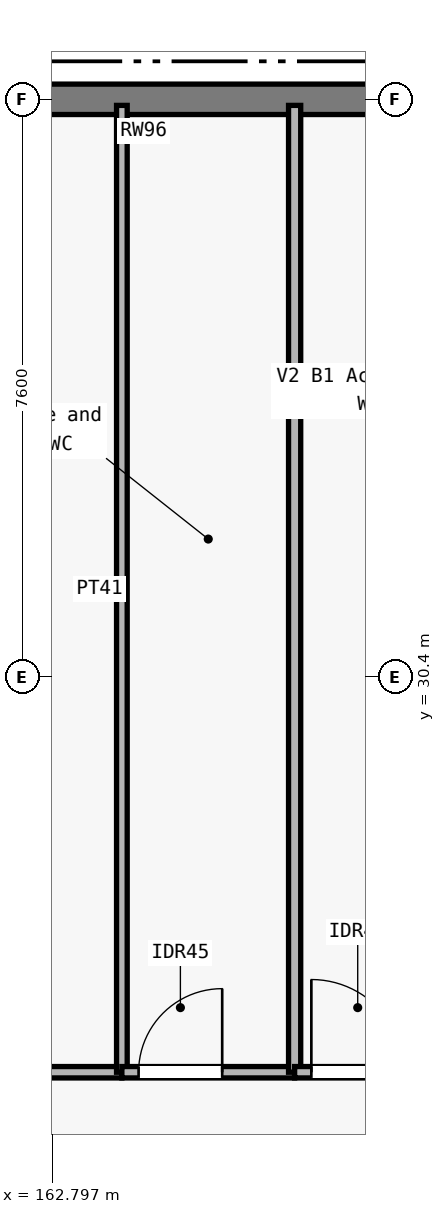
"""IFC4 building model, lengths in metres.
Left out: names, types, materials, properties, quantities, classifications, styles, units other than length and angle.
Written with IfcOpenShell. Run it as: python <this file> out.ifc"""

import sys

from ifc_helpers import new_model, si_unit, direction, frame, frame_2d, origin, place, context, subcontext, project, spatial, rectangle, extrude, element, fill, save


model = new_model("IFC4")
c1 = context("Model", 3, precision=1e-05, world=origin(), true_north=direction((0.0, 1.0)))
c2 = subcontext(c1, "Body", "Model", "MODEL_VIEW")
j1 = project(units=[si_unit("LENGTHUNIT", "METRE"), si_unit("PLANEANGLEUNIT", "RADIAN")], contexts=[c1])
p1 = place(None, origin())
s1 = spatial("IfcSite", under=j1, at=p1, CompositionType="ELEMENT")
p2 = place(p1, origin())
s2 = spatial("IfcBuilding", under=s1, at=p2, CompositionType="ELEMENT")
p3 = place(p2, frame((0.0, 0.0, -5.4)))
s3 = spatial("IfcBuildingStorey", under=s2, at=p3, CompositionType="ELEMENT", Elevation=-5.4)
p4 = place(p3, frame((168.0, 38.0, 0.0), z_axis=(0.0, 0.0, 1.0), x_axis=(-1.0, 0.0, 0.0)))
e1 = element("IfcWall", 1, at=p4, inside=s3, PredefinedType="USERDEFINED", context=c2, shape_type="SweptSolid", body=[
    extrude(rectangle(XDim=8.0, YDim=0.4, at=frame_2d((4.0, 0.0))), origin(), (0.0, 0.0, 1.0), 5.08),
])
p5 = place(p3, frame((155.033, 25.2, 0.0), z_axis=(0.0, 0.0, 1.0), x_axis=(1.0, 0.0, 0.0)))
e2 = element("IfcWall", 2, at=p5, inside=s3, PredefinedType="PARTITIONING", context=c2, shape_type="SweptSolid", body=[
    extrude(rectangle(XDim=8.68, YDim=0.15, at=frame_2d((4.34, 0.0))), origin(), (0.0, 0.0, 1.0), 4.255),
])
p6 = place(p5, frame((0.22, 0.0, 0.0)))
e3 = element("IfcOpeningElement", 3, at=p6, cuts=e2, PredefinedType="OPENING", context=c2, shape_type="SweptSolid", body=[
    extrude(rectangle(XDim=1.04, YDim=2.15, at=frame_2d((0.52, 1.075))), frame((0.0, 0.085, 0.0), z_axis=(0.0, -1.0, 0.0), x_axis=(1.0, 0.0, 0.0)), (0.0, 0.0, 1.0), 0.17),
])
p7 = place(p3, frame((163.713, 25.2, 0.0), z_axis=(0.0, 0.0, 1.0), x_axis=(0.0, 1.0, 0.0)))
e4 = element("IfcWall", 4, at=p7, inside=s3, PredefinedType="PARTITIONING", context=c2, shape_type="SweptSolid", body=[
    extrude(rectangle(XDim=12.72, YDim=0.14, at=frame_2d((6.36, 0.0))), origin(), (0.0, 0.0, 1.0), 4.255),
])
p8 = place(p3, frame((163.713, 25.2, 0.0), z_axis=(0.0, 0.0, 1.0), x_axis=(1.0, 0.0, 0.0)))
e5 = element("IfcWall", 5, at=p8, inside=s3, PredefinedType="PARTITIONING", context=c2, shape_type="SweptSolid", body=[
    extrude(rectangle(XDim=2.273, YDim=0.15, at=frame_2d((1.137, 0.0))), origin(), (0.0, 0.0, 1.0), 4.48),
])
p9 = place(p8, frame((0.22, 0.0, 0.0)))
e6 = element("IfcOpeningElement", 6, at=p9, cuts=e5, PredefinedType="OPENING", context=c2, shape_type="SweptSolid", body=[
    extrude(rectangle(XDim=1.1, YDim=2.15, at=frame_2d((0.55, 1.075))), frame((0.0, 0.085, 0.0), z_axis=(0.0, -1.0, 0.0), x_axis=(1.0, 0.0, 0.0)), (0.0, 0.0, 1.0), 0.17),
])
p10 = place(p3, frame((165.986, 25.2, 0.0), z_axis=(0.0, 0.0, 1.0), x_axis=(0.0, 1.0, 0.0)))
e7 = element("IfcWall", 7, at=p10, inside=s3, PredefinedType="PARTITIONING", context=c2, shape_type="SweptSolid", body=[
    extrude(rectangle(XDim=12.72, YDim=0.16, at=frame_2d((6.36, 0.0))), origin(), (0.0, 0.0, 1.0), 4.255),
])
p11 = place(p3, frame((165.986, 25.2, 0.0), z_axis=(0.0, 0.0, 1.0), x_axis=(1.0, 0.0, 0.0)))
e8 = element("IfcWall", 8, at=p11, inside=s3, PredefinedType="PARTITIONING", context=c2, shape_type="SweptSolid", body=[
    extrude(rectangle(XDim=1.964, YDim=0.15, at=frame_2d((0.982, 0.0))), origin(), (0.0, 0.0, 1.0), 4.43),
])
p12 = place(p11, frame((0.22, 0.0, 0.0)))
e9 = element("IfcOpeningElement", 9, at=p12, cuts=e8, PredefinedType="OPENING", context=c2, shape_type="SweptSolid", body=[
    extrude(rectangle(XDim=1.22, YDim=2.15, at=frame_2d((0.61, 1.075))), frame((0.0, 0.085, 0.0), z_axis=(0.0, -1.0, 0.0), x_axis=(1.0, 0.0, 0.0)), (0.0, 0.0, 1.0), 0.17),
])
p13 = place(p9, origin())
e10 = element("IfcDoor", 10, at=p13, inside=s3, OperationType="SINGLE_SWING_RIGHT", PredefinedType="DOOR", context=c2, shape_type="SweptSolid", body=[
    extrude(rectangle(XDim=1.1, YDim=2.15, at=frame_2d((0.55, 1.075))), frame((0.0, 0.025, 0.0), z_axis=(0.0, -1.0, 0.0), x_axis=(1.0, 0.0, 0.0)), (0.0, 0.0, 1.0), 0.05),
])
fill(e6, e10)
p14 = place(p12, origin())
e11 = element("IfcDoor", 11, at=p14, inside=s3, OperationType="SINGLE_SWING_LEFT", PredefinedType="DOOR", context=c2, shape_type="SweptSolid", body=[
    extrude(rectangle(XDim=1.22, YDim=2.15, at=frame_2d((0.61, 1.075))), frame((0.0, 0.025, 0.0), z_axis=(0.0, -1.0, 0.0), x_axis=(1.0, 0.0, 0.0)), (0.0, 0.0, 1.0), 0.05),
])
fill(e9, e11)
save(model, sys.argv[1])
